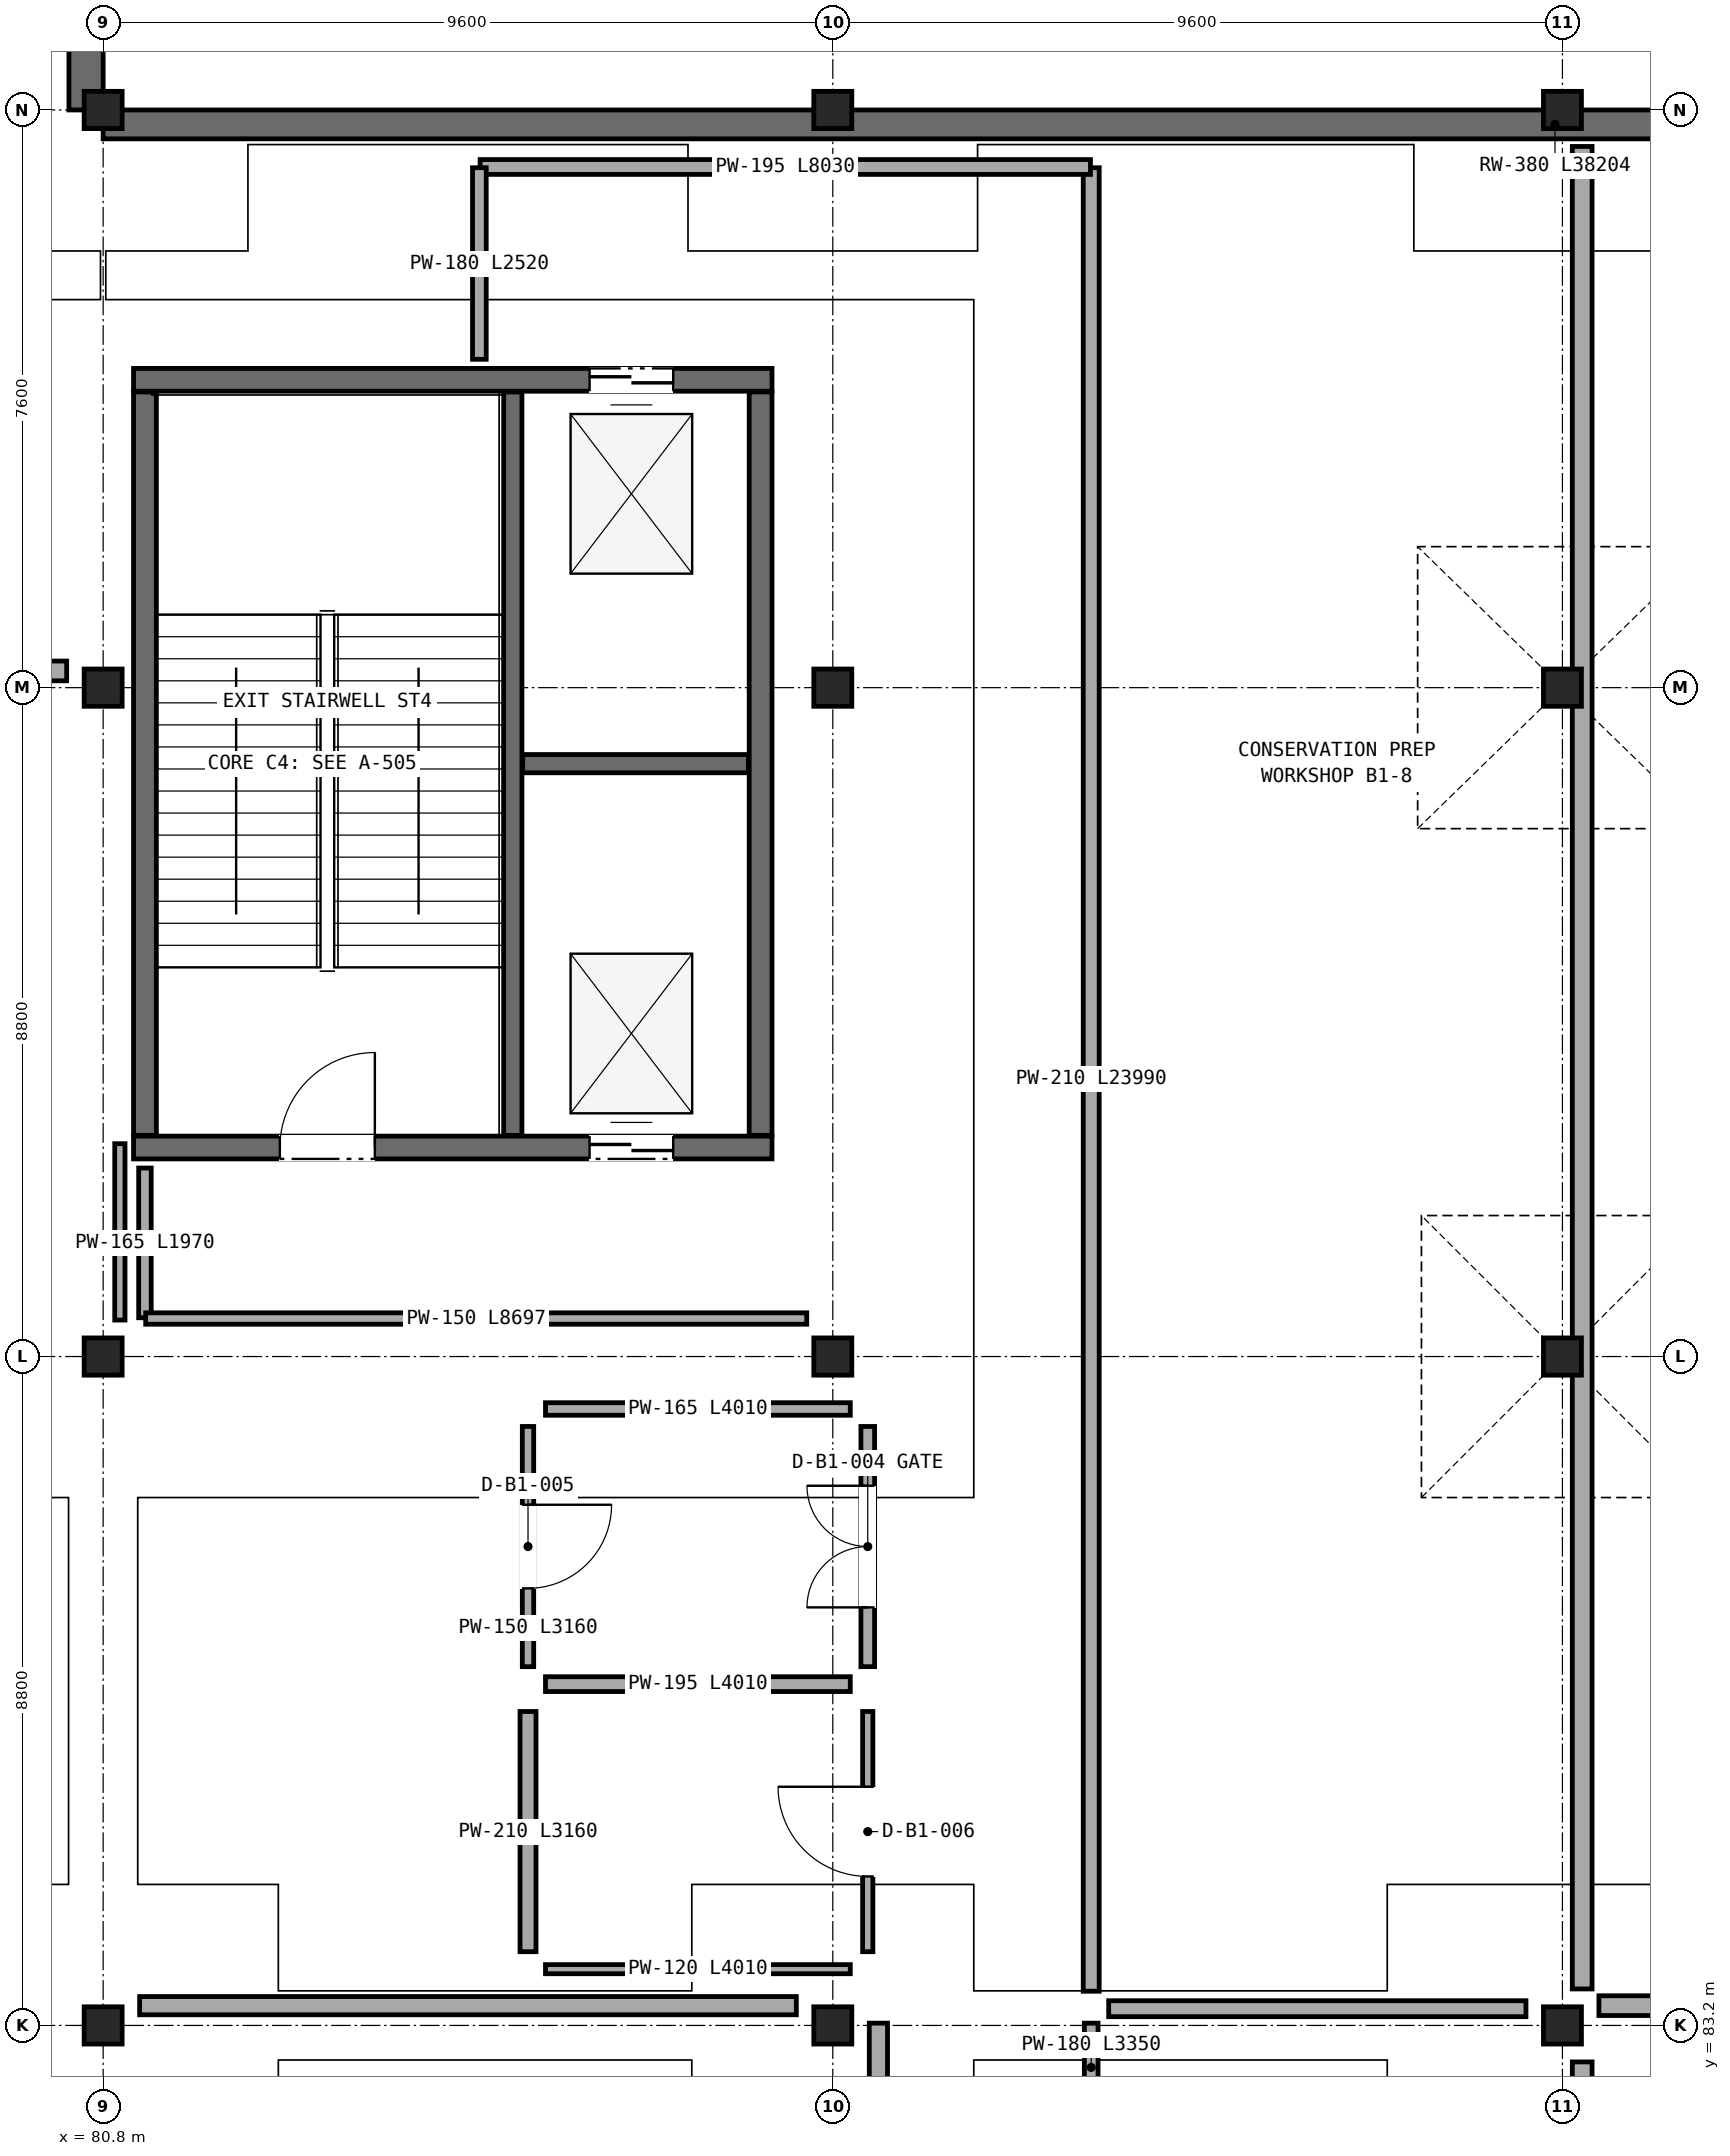
"""IFC4 building model, lengths in metres.
Left out: names, types, materials, properties, quantities, classifications, styles, units other than length and angle.
Written with IfcOpenShell. Run it as: python <this file> out.ifc"""

import sys

from ifc_helpers import new_model, si_unit, direction, frame, frame_2d, origin, origin_2d, place, context, subcontext, project, spatial, rectangle, i_section, extrude, element, fill, save


model = new_model("IFC4")
c1 = context("Model", 3, precision=1e-05, world=origin(), true_north=direction((0.0, 1.0)))
c2 = subcontext(c1, "Body", "Model", "MODEL_VIEW")
j1 = project(units=[si_unit("LENGTHUNIT", "METRE"), si_unit("PLANEANGLEUNIT", "RADIAN")], contexts=[c1])
p1 = place(None, origin())
s1 = spatial("IfcSite", under=j1, at=p1, CompositionType="ELEMENT")
p2 = place(p1, origin())
s2 = spatial("IfcBuilding", under=s1, at=p2, CompositionType="ELEMENT")
p3 = place(p2, frame((0.0, 0.0, -5.4)))
s3 = spatial("IfcBuildingStorey", under=s2, at=p3, CompositionType="ELEMENT", Elevation=-5.4)
for number, where, z_axis, x_axis in (
    (1, (90.4, 83.2, 0.0), (0.0, 0.0, 1.0), (1.0, 0.0, 0.0)),
    (2, (90.4, 92.0, 0.0), (0.0, 0.0, 1.0), (1.0, 0.0, 0.0)),
    (3, (90.4, 100.8, 0.0), (0.0, 0.0, 1.0), (1.0, 0.0, 0.0)),
    (4, (90.4, 108.4, 0.0), (0.0, 0.0, 1.0), (1.0, 0.0, 0.0)),
    (5, (100.0, 83.2, 0.0), (0.0, 0.0, 1.0), (1.0, 0.0, 0.0)),
    (6, (100.0, 92.0, 0.0), (0.0, 0.0, 1.0), (1.0, 0.0, 0.0)),
    (7, (100.0, 100.8, 0.0), (0.0, 0.0, 1.0), (1.0, 0.0, 0.0)),
    (8, (100.0, 108.4, 0.0), (0.0, 0.0, 1.0), (1.0, 0.0, 0.0)),
    (9, (80.8, 83.2, 0.0), (0.0, 0.0, 1.0), (1.0, 0.0, 0.0)),
    (10, (80.8, 92.0, 0.0), (0.0, 0.0, 1.0), (1.0, 0.0, 0.0)),
    (11, (80.8, 100.8, 0.0), (0.0, 0.0, 1.0), (1.0, 0.0, 0.0)),
    (12, (80.8, 108.4, 0.0), (0.0, 0.0, 1.0), (1.0, 0.0, 0.0)),
):
    element("IfcColumn", number, at=place(p3, frame(where, z_axis=z_axis, x_axis=x_axis)), inside=s3, PredefinedType="COLUMN", context=c2, shape_type="SweptSolid", body=[
        extrude(i_section(OverallWidth=0.5, OverallDepth=0.49, WebThickness=0.028, FlangeThickness=0.04, at=origin_2d()), origin(), (0.0, 0.0, 1.0), 5.4),
    ])
p4 = place(p3, frame((119.004, 108.21, 0.0), z_axis=(0.0, 0.0, 1.0), x_axis=(-1.0, 0.0, 0.0)))
e13 = element("IfcWall", 13, at=p4, inside=s3, PredefinedType="USERDEFINED", context=c2, shape_type="SweptSolid", body=[
    extrude(rectangle(XDim=38.204, YDim=0.38, at=frame_2d((19.102, 0.0))), origin(), (0.0, 0.0, 1.0), 5.06),
])
p5 = place(p3, frame((80.575, 108.4, 0.0), z_axis=(0.0, 0.0, 1.0), x_axis=(0.0, 1.0, 0.0)))
e14 = element("IfcWall", 14, at=p5, inside=s3, PredefinedType="USERDEFINED", context=c2, shape_type="SweptSolid", body=[
    extrude(rectangle(XDim=6.8, YDim=0.45, at=frame_2d((3.4, 0.0))), origin(), (0.0, 0.0, 1.0), 5.06),
])
p6 = place(p3, frame((81.2, 94.75, 0.0), z_axis=(0.0, 0.0, 1.0), x_axis=(1.0, 0.0, 0.0)))
e15 = element("IfcWall", 15, at=p6, inside=s3, PredefinedType="SHEAR", context=c2, shape_type="SweptSolid", body=[
    extrude(rectangle(XDim=8.4, YDim=0.3, at=frame_2d((4.2, 0.0))), origin(), (0.0, 0.0, 1.0), 5.095),
])
p7 = place(p6, frame((1.925, 0.0, 0.0)))
e16 = element("IfcOpeningElement", 16, at=p7, cuts=e15, PredefinedType="OPENING", context=c2, shape_type="SweptSolid", body=[
    extrude(rectangle(XDim=1.25, YDim=2.2, at=frame_2d((0.625, 1.1))), frame((0.0, 0.16, 0.0), z_axis=(0.0, -1.0, 0.0), x_axis=(1.0, 0.0, 0.0)), (0.0, 0.0, 1.0), 0.32),
])
p8 = place(p6, frame((6.0, 0.0, 0.0)))
e17 = element("IfcOpeningElement", 17, at=p8, cuts=e15, PredefinedType="OPENING", context=c2, shape_type="SweptSolid", body=[
    extrude(rectangle(XDim=1.1, YDim=2.2, at=frame_2d((0.55, 1.1))), frame((0.0, 0.16, 0.0), z_axis=(0.0, -1.0, 0.0), x_axis=(1.0, 0.0, 0.0)), (0.0, 0.0, 1.0), 0.32),
])
p9 = place(p3, frame((89.6, 104.85, 0.0), z_axis=(0.0, 0.0, 1.0), x_axis=(-1.0, 0.0, 0.0)))
e18 = element("IfcWall", 18, at=p9, inside=s3, PredefinedType="SHEAR", context=c2, shape_type="SweptSolid", body=[
    extrude(rectangle(XDim=8.4, YDim=0.3, at=frame_2d((4.2, 0.0))), origin(), (0.0, 0.0, 1.0), 5.095),
])
p10 = place(p9, frame((1.3, 0.0, 0.0)))
e19 = element("IfcOpeningElement", 19, at=p10, cuts=e18, PredefinedType="OPENING", context=c2, shape_type="SweptSolid", body=[
    extrude(rectangle(XDim=1.1, YDim=2.2, at=frame_2d((0.55, 1.1))), frame((0.0, 0.16, 0.0), z_axis=(0.0, -1.0, 0.0), x_axis=(1.0, 0.0, 0.0)), (0.0, 0.0, 1.0), 0.32),
])
for number, where, z_axis, x_axis in (
    (20, (89.45, 94.91, 0.0), (0.0, 0.0, 1.0), (0.0, 1.0, 0.0)),
    (21, (81.35, 104.69, 0.0), (0.0, 0.0, 1.0), (0.0, -1.0, 0.0)),
):
    element("IfcWall", number, at=place(p3, frame(where, z_axis=z_axis, x_axis=x_axis)), inside=s3, PredefinedType="SHEAR", context=c2, shape_type="SweptSolid", body=[
        extrude(rectangle(XDim=9.78, YDim=0.3, at=frame_2d((4.89, 0.0))), origin(), (0.0, 0.0, 1.0), 5.095),
    ])
p11 = place(p3, frame((86.19, 94.91, 0.0), z_axis=(0.0, 0.0, 1.0), x_axis=(0.0, 1.0, 0.0)))
e22 = element("IfcWall", 22, at=p11, inside=s3, PredefinedType="SOLIDWALL", context=c2, shape_type="SweptSolid", body=[
    extrude(rectangle(XDim=9.78, YDim=0.24, at=frame_2d((4.89, 0.0))), origin(), (0.0, 0.0, 1.0), 5.095),
])
p12 = place(p3, frame((86.32, 99.8, 0.0), z_axis=(0.0, 0.0, 1.0), x_axis=(1.0, 0.0, 0.0)))
e23 = element("IfcWall", 23, at=p12, inside=s3, PredefinedType="SOLIDWALL", context=c2, shape_type="SweptSolid", body=[
    extrude(rectangle(XDim=2.97, YDim=0.24, at=frame_2d((1.485, 0.0))), origin(), (0.0, 0.0, 1.0), 5.095),
])
p13 = place(p3, frame((90.63, 87.69, 0.0), z_axis=(0.0, 0.0, 1.0), x_axis=(-1.0, 0.0, 0.0)))
e24 = element("IfcWall", 24, at=p13, inside=s3, PredefinedType="PARTITIONING", context=c2, shape_type="SweptSolid", body=[
    extrude(rectangle(XDim=4.01, YDim=0.195, at=frame_2d((2.005, 0.0))), origin(), (0.0, 0.0, 1.0), 4.537),
])
p14 = place(p3, frame((90.86, 91.08, 0.0), z_axis=(0.0, 0.0, 1.0), x_axis=(0.0, -1.0, 0.0)))
e25 = element("IfcWall", 25, at=p14, inside=s3, PredefinedType="PARTITIONING", context=c2, shape_type="SweptSolid", body=[
    extrude(rectangle(XDim=3.16, YDim=0.18, at=frame_2d((1.58, 0.0))), origin(), (0.0, 0.0, 1.0), 5.03),
])
p15 = place(p14, frame((0.78, 0.0, 0.0)))
e26 = element("IfcOpeningElement", 26, at=p15, cuts=e25, PredefinedType="OPENING", context=c2, shape_type="SweptSolid", body=[
    extrude(rectangle(XDim=1.6, YDim=2.1, at=frame_2d((0.8, 1.05))), frame((0.0, 0.1, 0.0), z_axis=(0.0, -1.0, 0.0), x_axis=(1.0, 0.0, 0.0)), (0.0, 0.0, 1.0), 0.2),
])
p16 = place(p3, frame((86.62, 91.31, 0.0), z_axis=(0.0, 0.0, 1.0), x_axis=(1.0, 0.0, 0.0)))
e27 = element("IfcWall", 27, at=p16, inside=s3, PredefinedType="PARTITIONING", context=c2, shape_type="SweptSolid", body=[
    extrude(rectangle(XDim=4.01, YDim=0.165, at=frame_2d((2.005, 0.0))), origin(), (0.0, 0.0, 1.0), 4.537),
])
p17 = place(p3, frame((86.39, 87.92, 0.0), z_axis=(0.0, 0.0, 1.0), x_axis=(0.0, 1.0, 0.0)))
e28 = element("IfcWall", 28, at=p17, inside=s3, PredefinedType="PARTITIONING", context=c2, shape_type="SweptSolid", body=[
    extrude(rectangle(XDim=3.16, YDim=0.15, at=frame_2d((1.58, 0.0))), origin(), (0.0, 0.0, 1.0), 5.03),
])
p18 = place(p17, frame((1.03, 0.0, 0.0)))
e29 = element("IfcOpeningElement", 29, at=p18, cuts=e28, PredefinedType="OPENING", context=c2, shape_type="SweptSolid", body=[
    extrude(rectangle(XDim=1.1, YDim=2.08, at=frame_2d((0.55, 1.04))), frame((0.0, 0.085, 0.0), z_axis=(0.0, -1.0, 0.0), x_axis=(1.0, 0.0, 0.0)), (0.0, 0.0, 1.0), 0.17),
])
p19 = place(p3, frame((90.86, 87.33, 0.0), z_axis=(0.0, 0.0, 1.0), x_axis=(0.0, -1.0, 0.0)))
e30 = element("IfcWall", 30, at=p19, inside=s3, PredefinedType="PARTITIONING", context=c2, shape_type="SweptSolid", body=[
    extrude(rectangle(XDim=3.16, YDim=0.135, at=frame_2d((1.58, 0.0))), origin(), (0.0, 0.0, 1.0), 5.03),
])
p20 = place(p19, frame((0.99, 0.0, 0.0)))
e31 = element("IfcOpeningElement", 31, at=p20, cuts=e30, PredefinedType="OPENING", context=c2, shape_type="SweptSolid", body=[
    extrude(rectangle(XDim=1.18, YDim=2.08, at=frame_2d((0.59, 1.04))), frame((0.0, 0.078, 0.0), z_axis=(0.0, -1.0, 0.0), x_axis=(1.0, 0.0, 0.0)), (0.0, 0.0, 1.0), 0.155),
])
p21 = place(p3, frame((90.63, 83.94, 0.0), z_axis=(0.0, 0.0, 1.0), x_axis=(-1.0, 0.0, 0.0)))
e32 = element("IfcWall", 32, at=p21, inside=s3, PredefinedType="PARTITIONING", context=c2, shape_type="SweptSolid", body=[
    extrude(rectangle(XDim=4.01, YDim=0.12, at=frame_2d((2.005, 0.0))), origin(), (0.0, 0.0, 1.0), 4.537),
])
p22 = place(p3, frame((86.39, 84.17, 0.0), z_axis=(0.0, 0.0, 1.0), x_axis=(0.0, 1.0, 0.0)))
e33 = element("IfcWall", 33, at=p22, inside=s3, PredefinedType="PARTITIONING", context=c2, shape_type="SweptSolid", body=[
    extrude(rectangle(XDim=3.16, YDim=0.21, at=frame_2d((1.58, 0.0))), origin(), (0.0, 0.0, 1.0), 5.03),
])
p23 = place(p3, frame((91.0, 83.23, 0.0), z_axis=(0.0, 0.0, 1.0), x_axis=(0.0, -1.0, 0.0)))
e34 = element("IfcWall", 34, at=p23, inside=s3, PredefinedType="SOLIDWALL", context=c2, shape_type="SweptSolid", body=[
    extrude(rectangle(XDim=3.35, YDim=0.24, at=frame_2d((1.675, 0.0))), origin(), (0.0, 0.0, 1.0), 4.458),
])
p24 = place(p3, frame((93.8, 83.65, 0.0), z_axis=(0.0, 0.0, 1.0), x_axis=(0.0, 1.0, 0.0)))
e35 = element("IfcWall", 35, at=p24, inside=s3, PredefinedType="PARTITIONING", context=c2, shape_type="SweptSolid", body=[
    extrude(rectangle(XDim=23.99, YDim=0.21, at=frame_2d((11.995, 0.0))), origin(), (0.0, 0.0, 1.0), 4.458),
])
p25 = place(p3, frame((93.79, 107.65, 0.0), z_axis=(0.0, 0.0, 1.0), x_axis=(-1.0, 0.0, 0.0)))
e36 = element("IfcWall", 36, at=p25, inside=s3, PredefinedType="PARTITIONING", context=c2, shape_type="SweptSolid", body=[
    extrude(rectangle(XDim=8.03, YDim=0.195, at=frame_2d((4.015, 0.0))), origin(), (0.0, 0.0, 1.0), 4.537),
])
p26 = place(p3, frame((85.75, 107.64, 0.0), z_axis=(0.0, 0.0, 1.0), x_axis=(0.0, -1.0, 0.0)))
e37 = element("IfcWall", 37, at=p26, inside=s3, PredefinedType="PARTITIONING", context=c2, shape_type="SweptSolid", body=[
    extrude(rectangle(XDim=2.52, YDim=0.18, at=frame_2d((1.26, 0.0))), origin(), (0.0, 0.0, 1.0), 5.03),
])
p27 = place(p3, frame((81.35, 94.48, 0.0), z_axis=(0.0, 0.0, 1.0), x_axis=(0.0, -1.0, 0.0)))
e38 = element("IfcWall", 38, at=p27, inside=s3, PredefinedType="PARTITIONING", context=c2, shape_type="SweptSolid", body=[
    extrude(rectangle(XDim=1.97, YDim=0.165, at=frame_2d((0.985, 0.0))), origin(), (0.0, 0.0, 1.0), 5.03),
])
p28 = place(p3, frame((81.36, 92.5, 0.0), z_axis=(0.0, 0.0, 1.0), x_axis=(1.0, 0.0, 0.0)))
e39 = element("IfcWall", 39, at=p28, inside=s3, PredefinedType="PARTITIONING", context=c2, shape_type="SweptSolid", body=[
    extrude(rectangle(XDim=8.697, YDim=0.15, at=frame_2d((4.349, 0.0))), origin(), (0.0, 0.0, 1.0), 5.03),
])
p29 = place(p3, frame((81.02, 92.48, 0.0), z_axis=(0.0, 0.0, 1.0), x_axis=(0.0, 1.0, 0.0)))
e40 = element("IfcWall", 40, at=p29, inside=s3, PredefinedType="PARTITIONING", context=c2, shape_type="SweptSolid", body=[
    extrude(rectangle(XDim=2.32, YDim=0.135, at=frame_2d((1.16, 0.0))), origin(), (0.0, 0.0, 1.0), 4.527),
])
p30 = place(p3, frame((93.8, 79.88, 0.0), z_axis=(0.0, 0.0, 1.0), x_axis=(0.0, 1.0, 0.0)))
e41 = element("IfcWall", 41, at=p30, inside=s3, PredefinedType="PARTITIONING", context=c2, shape_type="SweptSolid", body=[
    extrude(rectangle(XDim=3.35, YDim=0.18, at=frame_2d((1.675, 0.0))), origin(), (0.0, 0.0, 1.0), 4.458),
])
p31 = place(p30, frame((1.165, 0.0, 0.0)))
e42 = element("IfcOpeningElement", 42, at=p31, cuts=e41, PredefinedType="OPENING", context=c2, shape_type="SweptSolid", body=[
    extrude(rectangle(XDim=1.02, YDim=2.24, at=frame_2d((0.51, 1.12))), frame((0.0, 0.1, 0.0), z_axis=(0.0, -1.0, 0.0), x_axis=(1.0, 0.0, 0.0)), (0.0, 0.0, 1.0), 0.2),
])
p32 = place(p3, frame((81.28, 83.46, 0.0), z_axis=(0.0, 0.0, 1.0), x_axis=(1.0, 0.0, 0.0)))
e43 = element("IfcWall", 43, at=p32, inside=s3, PredefinedType="SOLIDWALL", context=c2, shape_type="SweptSolid", body=[
    extrude(rectangle(XDim=8.64, YDim=0.24, at=frame_2d((4.32, 0.0))), origin(), (0.0, 0.0, 1.0), 4.458),
])
p33 = place(p3, frame((99.52, 83.42, 0.0), z_axis=(0.0, 0.0, 1.0), x_axis=(-1.0, 0.0, 0.0)))
e44 = element("IfcWall", 44, at=p33, inside=s3, PredefinedType="PARTITIONING", context=c2, shape_type="SweptSolid", body=[
    extrude(rectangle(XDim=5.49, YDim=0.21, at=frame_2d((2.745, 0.0))), origin(), (0.0, 0.0, 1.0), 4.458),
])
p34 = place(p3, frame((100.26, 107.92, 0.0), z_axis=(0.0, 0.0, 1.0), x_axis=(0.0, -1.0, 0.0)))
e45 = element("IfcWall", 45, at=p34, inside=s3, PredefinedType="SOLIDWALL", context=c2, shape_type="SweptSolid", body=[
    extrude(rectangle(XDim=24.24, YDim=0.26, at=frame_2d((12.12, 0.0))), origin(), (0.0, 0.0, 1.0), 4.458),
])
p35 = place(p3, frame((100.26, 82.72, 0.0), z_axis=(0.0, 0.0, 1.0), x_axis=(0.0, -1.0, 0.0)))
e46 = element("IfcWall", 46, at=p35, inside=s3, PredefinedType="SOLIDWALL", context=c2, shape_type="SweptSolid", body=[
    extrude(rectangle(XDim=2.84, YDim=0.26, at=frame_2d((1.42, 0.0))), origin(), (0.0, 0.0, 1.0), 5.03),
])
p36 = place(p3, frame((100.48, 83.46, 0.0), z_axis=(0.0, 0.0, 1.0), x_axis=(1.0, 0.0, 0.0)))
e47 = element("IfcWall", 47, at=p36, inside=s3, PredefinedType="SOLIDWALL", context=c2, shape_type="SweptSolid", body=[
    extrude(rectangle(XDim=5.49, YDim=0.26, at=frame_2d((2.745, 0.0))), origin(), (0.0, 0.0, 1.0), 4.458),
])
p37 = place(p3, frame((80.32, 101.02, 0.0), z_axis=(0.0, 0.0, 1.0), x_axis=(-1.0, 0.0, 0.0)))
e48 = element("IfcWall", 48, at=p37, inside=s3, PredefinedType="SOLIDWALL", context=c2, shape_type="SweptSolid", body=[
    extrude(rectangle(XDim=8.64, YDim=0.26, at=frame_2d((4.32, 0.0))), origin(), (0.0, 0.0, 1.0), 4.448),
])
p38 = place(p7, origin())
e49 = element("IfcDoor", 49, at=p38, inside=s3, OperationType="SINGLE_SWING_RIGHT", PredefinedType="DOOR", context=c2, shape_type="SweptSolid", body=[
    extrude(rectangle(XDim=1.25, YDim=2.2, at=frame_2d((0.625, 1.1))), frame((0.0, 0.025, 0.0), z_axis=(0.0, -1.0, 0.0), x_axis=(1.0, 0.0, 0.0)), (0.0, 0.0, 1.0), 0.05),
])
fill(e16, e49)
p39 = place(p8, origin())
e50 = element("IfcDoor", 50, at=p39, inside=s3, OperationType="DOUBLE_DOOR_SLIDING", PredefinedType="DOOR", context=c2, shape_type="SweptSolid", body=[
    extrude(rectangle(XDim=1.1, YDim=2.2, at=frame_2d((0.55, 1.1))), frame((0.0, 0.025, 0.0), z_axis=(0.0, -1.0, 0.0), x_axis=(1.0, 0.0, 0.0)), (0.0, 0.0, 1.0), 0.05),
])
fill(e17, e50)
p40 = place(p10, origin())
e51 = element("IfcDoor", 51, at=p40, inside=s3, OperationType="DOUBLE_DOOR_SLIDING", PredefinedType="DOOR", context=c2, shape_type="SweptSolid", body=[
    extrude(rectangle(XDim=1.1, YDim=2.2, at=frame_2d((0.55, 1.1))), frame((0.0, 0.025, 0.0), z_axis=(0.0, -1.0, 0.0), x_axis=(1.0, 0.0, 0.0)), (0.0, 0.0, 1.0), 0.05),
])
fill(e19, e51)
p41 = place(p15, frame((1.6, 0.0, 0.0), z_axis=(0.0, 0.0, 1.0), x_axis=(-1.0, 0.0, 0.0)))
e52 = element("IfcDoor", 52, at=p41, inside=s3, OperationType="DOUBLE_DOOR_SINGLE_SWING", PredefinedType="GATE", context=c2, shape_type="SweptSolid", body=[
    extrude(rectangle(XDim=1.6, YDim=2.1, at=frame_2d((0.8, 1.05))), frame((0.0, 0.025, 0.0), z_axis=(0.0, -1.0, 0.0), x_axis=(1.0, 0.0, 0.0)), (0.0, 0.0, 1.0), 0.05),
])
fill(e26, e52)
p42 = place(p18, frame((1.1, 0.0, 0.0), z_axis=(0.0, 0.0, 1.0), x_axis=(-1.0, 0.0, 0.0)))
e53 = element("IfcDoor", 53, at=p42, inside=s3, OperationType="SINGLE_SWING_RIGHT", PredefinedType="DOOR", context=c2, shape_type="SweptSolid", body=[
    extrude(rectangle(XDim=1.1, YDim=2.08, at=frame_2d((0.55, 1.04))), frame((0.0, 0.025, 0.0), z_axis=(0.0, -1.0, 0.0), x_axis=(1.0, 0.0, 0.0)), (0.0, 0.0, 1.0), 0.05),
])
fill(e29, e53)
p43 = place(p20, frame((1.18, 0.0, 0.0), z_axis=(0.0, 0.0, 1.0), x_axis=(-1.0, 0.0, 0.0)))
e54 = element("IfcDoor", 54, at=p43, inside=s3, OperationType="SINGLE_SWING_LEFT", PredefinedType="DOOR", context=c2, shape_type="SweptSolid", body=[
    extrude(rectangle(XDim=1.18, YDim=2.08, at=frame_2d((0.59, 1.04))), frame((0.0, 0.025, 0.0), z_axis=(0.0, -1.0, 0.0), x_axis=(1.0, 0.0, 0.0)), (0.0, 0.0, 1.0), 0.05),
])
fill(e31, e54)
save(model, sys.argv[1])
